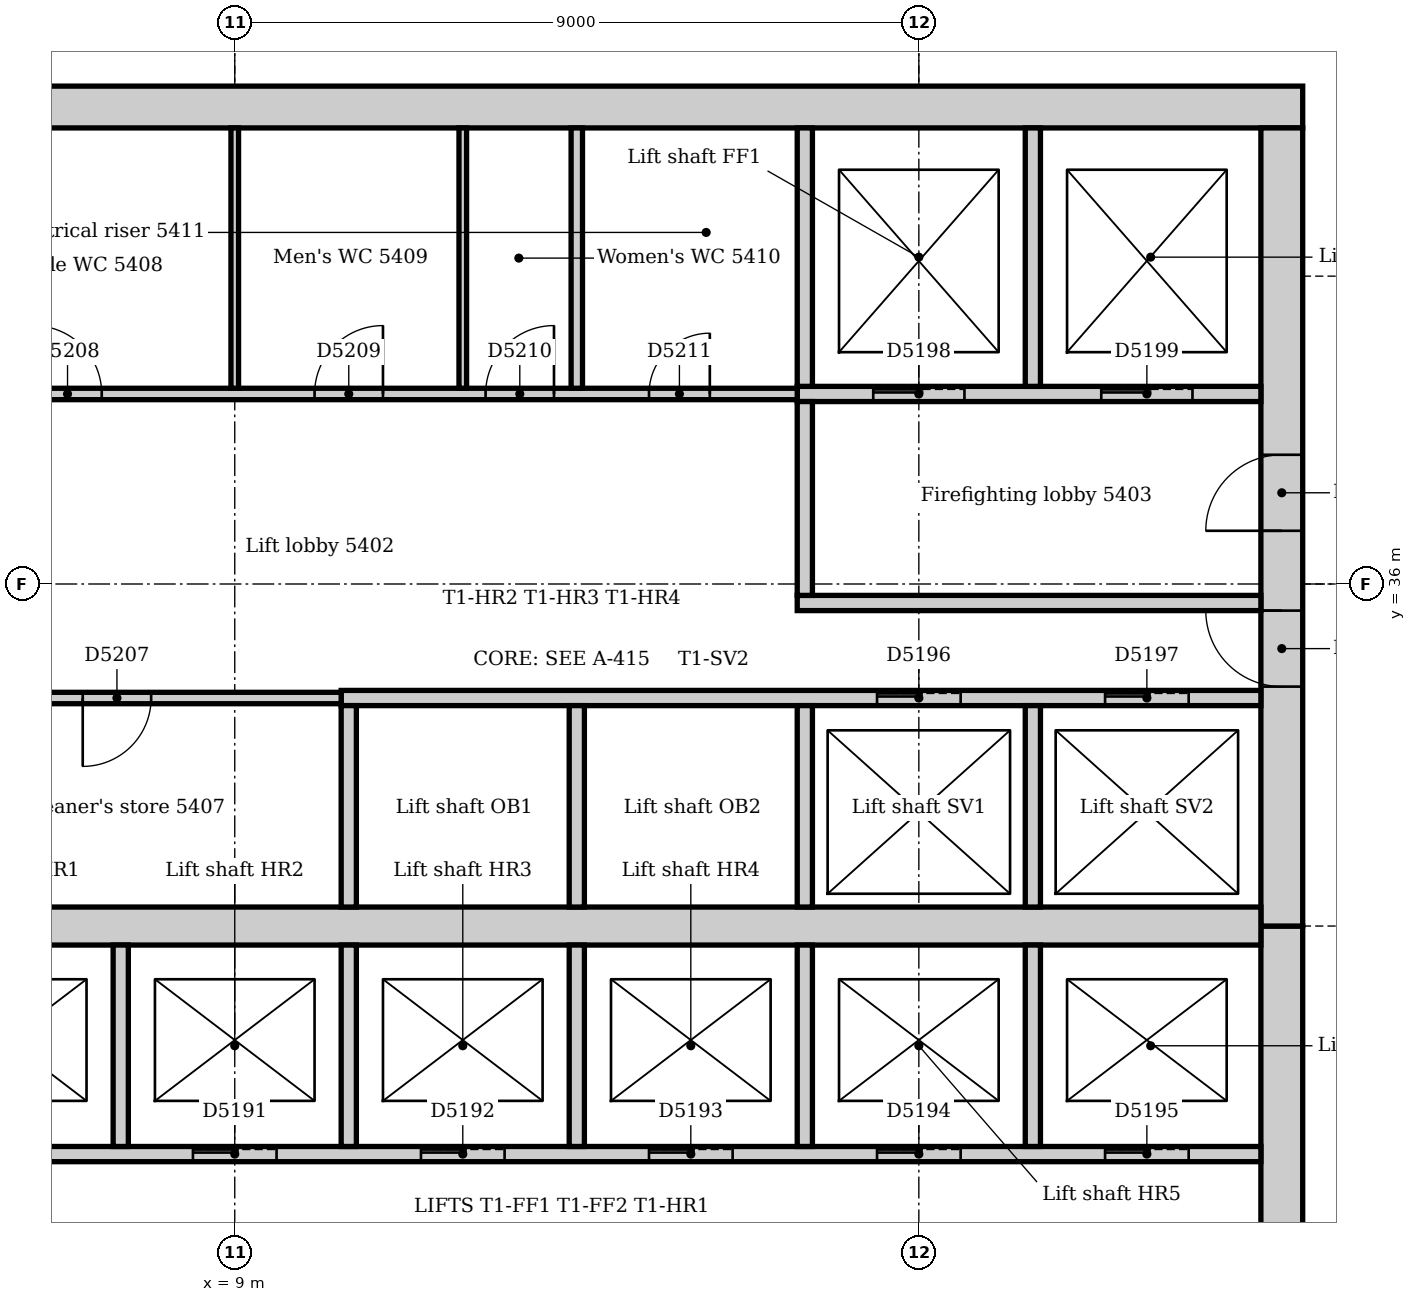
"""IFC4 building model, lengths in metres.
Left out: names, types, materials, properties, quantities, classifications, styles, units other than length and angle.
Written with IfcOpenShell. Run it as: python <this file> out.ifc"""

import sys

from ifc_helpers import new_model, si_unit, direction, frame, frame_2d, origin, place, context, subcontext, project, spatial, rectangle, extrude, element, fill, save


model = new_model("IFC4")
c1 = context("Model", 3, precision=1e-05, world=origin(), true_north=direction((0.0, 1.0)))
c2 = subcontext(c1, "Body", "Model", "MODEL_VIEW")
j1 = project(units=[si_unit("LENGTHUNIT", "METRE"), si_unit("PLANEANGLEUNIT", "RADIAN")], contexts=[c1])
p1 = place(None, origin())
s1 = spatial("IfcSite", under=j1, at=p1, CompositionType="ELEMENT")
p2 = place(p1, origin())
s2 = spatial("IfcBuilding", under=s1, at=p2, CompositionType="ELEMENT")
p3 = place(p2, frame((0.0, 0.0, 226.0)))
s3 = spatial("IfcBuildingStorey", under=s2, at=p3, CompositionType="ELEMENT", Elevation=226.0)
p4 = place(p3, frame((23.05, 42.275, 0.0), z_axis=(0.0, 0.0, 1.0), x_axis=(-1.0, 0.0, 0.0)))
e1 = element("IfcWall", 1, at=p4, inside=s3, PredefinedType="SOLIDWALL", context=c2, shape_type="SweptSolid", body=[
    extrude(rectangle(XDim=19.1, YDim=0.55, at=frame_2d((9.55, 0.0))), origin(), (0.0, 0.0, 1.0), 4.0),
])
p5 = place(p3, frame((22.775, 21.0, 0.0), z_axis=(0.0, 0.0, 1.0), x_axis=(0.0, 1.0, 0.0)))
e2 = element("IfcWall", 2, at=p5, inside=s3, PredefinedType="SOLIDWALL", context=c2, shape_type="SweptSolid", body=[
    extrude(rectangle(XDim=10.5, YDim=0.55, at=frame_2d((5.25, 0.0))), origin(), (0.0, 0.0, 1.0), 4.0),
])
p6 = place(p5, frame((4.35, 0.0, 0.0)))
e3 = element("IfcOpeningElement", 3, at=p6, cuts=e2, PredefinedType="OPENING", context=c2, shape_type="SweptSolid", body=[
    extrude(rectangle(XDim=1.8, YDim=2.1, at=frame_2d((0.9, 1.05))), frame((0.0, 0.285, 0.0), z_axis=(0.0, -1.0, 0.0), x_axis=(1.0, 0.0, 0.0)), (0.0, 0.0, 1.0), 0.57),
])
p7 = place(p3, frame((22.775, 31.5, 0.0), z_axis=(0.0, 0.0, 1.0), x_axis=(0.0, 1.0, 0.0)))
e4 = element("IfcWall", 4, at=p7, inside=s3, PredefinedType="SOLIDWALL", context=c2, shape_type="SweptSolid", body=[
    extrude(rectangle(XDim=10.5, YDim=0.55, at=frame_2d((5.25, 0.0))), origin(), (0.0, 0.0, 1.0), 4.0),
])
p8 = place(p7, frame((3.15, 0.0, 0.0)))
e5 = element("IfcOpeningElement", 5, at=p8, cuts=e4, PredefinedType="OPENING", context=c2, shape_type="SweptSolid", body=[
    extrude(rectangle(XDim=1.0, YDim=2.1, at=frame_2d((0.5, 1.05))), frame((0.0, 0.285, 0.0), z_axis=(0.0, -1.0, 0.0), x_axis=(1.0, 0.0, 0.0)), (0.0, 0.0, 1.0), 0.57),
])
p9 = place(p7, frame((5.2, 0.0, 0.0)))
e6 = element("IfcOpeningElement", 6, at=p9, cuts=e4, PredefinedType="OPENING", context=c2, shape_type="SweptSolid", body=[
    extrude(rectangle(XDim=1.0, YDim=2.1, at=frame_2d((0.5, 1.05))), frame((0.0, 0.285, 0.0), z_axis=(0.0, -1.0, 0.0), x_axis=(1.0, 0.0, 0.0)), (0.0, 0.0, 1.0), 0.57),
])
p10 = place(p3, frame((4.5, 31.5, 0.0), z_axis=(0.0, 0.0, 1.0), x_axis=(1.0, 0.0, 0.0)))
e7 = element("IfcWall", 7, at=p10, inside=s3, PredefinedType="SOLIDWALL", context=c2, shape_type="SweptSolid", body=[
    extrude(rectangle(XDim=18.0, YDim=0.5, at=frame_2d((9.0, 0.0))), origin(), (0.0, 0.0, 1.0), 4.0),
])
p11 = place(p3, frame((16.4, 35.75, 0.0), z_axis=(0.0, 0.0, 1.0), x_axis=(1.0, 0.0, 0.0)))
e8 = element("IfcWall", 8, at=p11, inside=s3, PredefinedType="PARTITIONING", context=c2, shape_type="SweptSolid", body=[
    extrude(rectangle(XDim=6.1, YDim=0.2, at=frame_2d((3.05, 0.0))), origin(), (0.0, 0.0, 1.0), 3.85),
])
p12 = place(p3, frame((16.4, 38.5, 0.0), z_axis=(0.0, 0.0, 1.0), x_axis=(1.0, 0.0, 0.0)))
e9 = element("IfcWall", 9, at=p12, inside=s3, PredefinedType="PARTITIONING", context=c2, shape_type="SweptSolid", body=[
    extrude(rectangle(XDim=6.1, YDim=0.2, at=frame_2d((3.05, 0.0))), origin(), (0.0, 0.0, 1.0), 3.85),
])
p13 = place(p12, frame((1.0, 0.0, 0.0)))
e10 = element("IfcOpeningElement", 10, at=p13, cuts=e9, PredefinedType="OPENING", context=c2, shape_type="SweptSolid", body=[
    extrude(rectangle(XDim=1.2, YDim=2.1, at=frame_2d((0.6, 1.05))), frame((0.0, 0.11, 0.0), z_axis=(0.0, -1.0, 0.0), x_axis=(1.0, 0.0, 0.0)), (0.0, 0.0, 1.0), 0.22),
])
p14 = place(p12, frame((4.0, 0.0, 0.0)))
e11 = element("IfcOpeningElement", 11, at=p14, cuts=e9, PredefinedType="OPENING", context=c2, shape_type="SweptSolid", body=[
    extrude(rectangle(XDim=1.2, YDim=2.1, at=frame_2d((0.6, 1.05))), frame((0.0, 0.11, 0.0), z_axis=(0.0, -1.0, 0.0), x_axis=(1.0, 0.0, 0.0)), (0.0, 0.0, 1.0), 0.22),
])
p15 = place(p3, frame((16.5, 35.85, 0.0), z_axis=(0.0, 0.0, 1.0), x_axis=(0.0, 1.0, 0.0)))
e12 = element("IfcWall", 12, at=p15, inside=s3, PredefinedType="PARTITIONING", context=c2, shape_type="SweptSolid", body=[
    extrude(rectangle(XDim=2.55, YDim=0.2, at=frame_2d((1.275, 0.0))), origin(), (0.0, 0.0, 1.0), 3.85),
])
p16 = place(p3, frame((4.5, 28.5, 0.0), z_axis=(0.0, 0.0, 1.0), x_axis=(1.0, 0.0, 0.0)))
e13 = element("IfcWall", 13, at=p16, inside=s3, PredefinedType="PARTITIONING", context=c2, shape_type="SweptSolid", body=[
    extrude(rectangle(XDim=18.0, YDim=0.2, at=frame_2d((9.0, 0.0))), origin(), (0.0, 0.0, 1.0), 3.85),
])
p17 = place(p16, frame((0.95, 0.0, 0.0)))
e14 = element("IfcOpeningElement", 14, at=p17, cuts=e13, PredefinedType="OPENING", context=c2, shape_type="SweptSolid", body=[
    extrude(rectangle(XDim=1.1, YDim=2.1, at=frame_2d((0.55, 1.05))), frame((0.0, 0.11, 0.0), z_axis=(0.0, -1.0, 0.0), x_axis=(1.0, 0.0, 0.0)), (0.0, 0.0, 1.0), 0.22),
])
p18 = place(p16, frame((3.95, 0.0, 0.0)))
e15 = element("IfcOpeningElement", 15, at=p18, cuts=e13, PredefinedType="OPENING", context=c2, shape_type="SweptSolid", body=[
    extrude(rectangle(XDim=1.1, YDim=2.1, at=frame_2d((0.55, 1.05))), frame((0.0, 0.11, 0.0), z_axis=(0.0, -1.0, 0.0), x_axis=(1.0, 0.0, 0.0)), (0.0, 0.0, 1.0), 0.22),
])
p19 = place(p16, frame((6.95, 0.0, 0.0)))
e16 = element("IfcOpeningElement", 16, at=p19, cuts=e13, PredefinedType="OPENING", context=c2, shape_type="SweptSolid", body=[
    extrude(rectangle(XDim=1.1, YDim=2.1, at=frame_2d((0.55, 1.05))), frame((0.0, 0.11, 0.0), z_axis=(0.0, -1.0, 0.0), x_axis=(1.0, 0.0, 0.0)), (0.0, 0.0, 1.0), 0.22),
])
p20 = place(p16, frame((9.95, 0.0, 0.0)))
e17 = element("IfcOpeningElement", 17, at=p20, cuts=e13, PredefinedType="OPENING", context=c2, shape_type="SweptSolid", body=[
    extrude(rectangle(XDim=1.1, YDim=2.1, at=frame_2d((0.55, 1.05))), frame((0.0, 0.11, 0.0), z_axis=(0.0, -1.0, 0.0), x_axis=(1.0, 0.0, 0.0)), (0.0, 0.0, 1.0), 0.22),
])
p21 = place(p16, frame((12.95, 0.0, 0.0)))
e18 = element("IfcOpeningElement", 18, at=p21, cuts=e13, PredefinedType="OPENING", context=c2, shape_type="SweptSolid", body=[
    extrude(rectangle(XDim=1.1, YDim=2.1, at=frame_2d((0.55, 1.05))), frame((0.0, 0.11, 0.0), z_axis=(0.0, -1.0, 0.0), x_axis=(1.0, 0.0, 0.0)), (0.0, 0.0, 1.0), 0.22),
])
p22 = place(p16, frame((15.95, 0.0, 0.0)))
e19 = element("IfcOpeningElement", 19, at=p22, cuts=e13, PredefinedType="OPENING", context=c2, shape_type="SweptSolid", body=[
    extrude(rectangle(XDim=1.1, YDim=2.1, at=frame_2d((0.55, 1.05))), frame((0.0, 0.11, 0.0), z_axis=(0.0, -1.0, 0.0), x_axis=(1.0, 0.0, 0.0)), (0.0, 0.0, 1.0), 0.22),
])
p23 = place(p3, frame((10.4, 34.5, 0.0), z_axis=(0.0, 0.0, 1.0), x_axis=(1.0, 0.0, 0.0)))
e20 = element("IfcWall", 20, at=p23, inside=s3, PredefinedType="PARTITIONING", context=c2, shape_type="SweptSolid", body=[
    extrude(rectangle(XDim=12.1, YDim=0.2, at=frame_2d((6.05, 0.0))), origin(), (0.0, 0.0, 1.0), 3.85),
])
p24 = place(p23, frame((7.05, 0.0, 0.0)))
e21 = element("IfcOpeningElement", 21, at=p24, cuts=e20, PredefinedType="OPENING", context=c2, shape_type="SweptSolid", body=[
    extrude(rectangle(XDim=1.1, YDim=2.1, at=frame_2d((0.55, 1.05))), frame((0.0, 0.11, 0.0), z_axis=(0.0, -1.0, 0.0), x_axis=(1.0, 0.0, 0.0)), (0.0, 0.0, 1.0), 0.22),
])
p25 = place(p23, frame((10.05, 0.0, 0.0)))
e22 = element("IfcOpeningElement", 22, at=p25, cuts=e20, PredefinedType="OPENING", context=c2, shape_type="SweptSolid", body=[
    extrude(rectangle(XDim=1.1, YDim=2.1, at=frame_2d((0.55, 1.05))), frame((0.0, 0.11, 0.0), z_axis=(0.0, -1.0, 0.0), x_axis=(1.0, 0.0, 0.0)), (0.0, 0.0, 1.0), 0.22),
])
for number, where, z_axis, x_axis in (
    (23, (10.5, 28.6, 0.0), (0.0, 0.0, 1.0), (0.0, 1.0, 0.0)),
    (24, (10.5, 31.75, 0.0), (0.0, 0.0, 1.0), (0.0, 1.0, 0.0)),
    (25, (13.5, 28.6, 0.0), (0.0, 0.0, 1.0), (0.0, 1.0, 0.0)),
    (26, (13.5, 31.75, 0.0), (0.0, 0.0, 1.0), (0.0, 1.0, 0.0)),
    (27, (16.5, 28.6, 0.0), (0.0, 0.0, 1.0), (0.0, 1.0, 0.0)),
    (28, (16.5, 31.75, 0.0), (0.0, 0.0, 1.0), (0.0, 1.0, 0.0)),
    (29, (19.5, 28.6, 0.0), (0.0, 0.0, 1.0), (0.0, 1.0, 0.0)),
    (30, (19.5, 31.75, 0.0), (0.0, 0.0, 1.0), (0.0, 1.0, 0.0)),
):
    element("IfcWall", number, at=place(p3, frame(where, z_axis=z_axis, x_axis=x_axis)), inside=s3, PredefinedType="PARTITIONING", context=c2, shape_type="SweptSolid", body=[
        extrude(rectangle(XDim=2.65, YDim=0.2, at=frame_2d((1.325, 0.0))), origin(), (0.0, 0.0, 1.0), 3.85),
    ])
for number, where, z_axis, x_axis in (
    (31, (16.5, 38.6, 0.0), (0.0, 0.0, 1.0), (0.0, 1.0, 0.0)),
    (32, (19.5, 38.6, 0.0), (0.0, 0.0, 1.0), (0.0, 1.0, 0.0)),
):
    element("IfcWall", number, at=place(p3, frame(where, z_axis=z_axis, x_axis=x_axis)), inside=s3, PredefinedType="PARTITIONING", context=c2, shape_type="SweptSolid", body=[
        extrude(rectangle(XDim=3.4, YDim=0.2, at=frame_2d((1.7, 0.0))), origin(), (0.0, 0.0, 1.0), 3.85),
    ])
p26 = place(p3, frame((7.5, 28.6, 0.0), z_axis=(0.0, 0.0, 1.0), x_axis=(0.0, 1.0, 0.0)))
e33 = element("IfcWall", 33, at=p26, inside=s3, PredefinedType="PARTITIONING", context=c2, shape_type="SweptSolid", body=[
    extrude(rectangle(XDim=2.65, YDim=0.2, at=frame_2d((1.325, 0.0))), origin(), (0.0, 0.0, 1.0), 3.85),
])
p27 = place(p3, frame((4.5, 38.5, 0.0), z_axis=(0.0, 0.0, 1.0), x_axis=(1.0, 0.0, 0.0)))
e34 = element("IfcWall", 34, at=p27, inside=s3, PredefinedType="PARTITIONING", context=c2, shape_type="SweptSolid", body=[
    extrude(rectangle(XDim=11.9, YDim=0.15, at=frame_2d((5.95, 0.0))), origin(), (0.0, 0.0, 1.0), 3.85),
])
p28 = place(p27, frame((1.85, 0.0, 0.0)))
e35 = element("IfcOpeningElement", 35, at=p28, cuts=e34, PredefinedType="OPENING", context=c2, shape_type="SweptSolid", body=[
    extrude(rectangle(XDim=0.9, YDim=2.1, at=frame_2d((0.45, 1.05))), frame((0.0, 0.085, 0.0), z_axis=(0.0, -1.0, 0.0), x_axis=(1.0, 0.0, 0.0)), (0.0, 0.0, 1.0), 0.17),
])
p29 = place(p27, frame((5.55, 0.0, 0.0)))
e36 = element("IfcOpeningElement", 36, at=p29, cuts=e34, PredefinedType="OPENING", context=c2, shape_type="SweptSolid", body=[
    extrude(rectangle(XDim=0.9, YDim=2.1, at=frame_2d((0.45, 1.05))), frame((0.0, 0.085, 0.0), z_axis=(0.0, -1.0, 0.0), x_axis=(1.0, 0.0, 0.0)), (0.0, 0.0, 1.0), 0.17),
])
p30 = place(p27, frame((7.8, 0.0, 0.0)))
e37 = element("IfcOpeningElement", 37, at=p30, cuts=e34, PredefinedType="OPENING", context=c2, shape_type="SweptSolid", body=[
    extrude(rectangle(XDim=0.9, YDim=2.1, at=frame_2d((0.45, 1.05))), frame((0.0, 0.085, 0.0), z_axis=(0.0, -1.0, 0.0), x_axis=(1.0, 0.0, 0.0)), (0.0, 0.0, 1.0), 0.17),
])
p31 = place(p27, frame((9.95, 0.0, 0.0)))
e38 = element("IfcOpeningElement", 38, at=p31, cuts=e34, PredefinedType="OPENING", context=c2, shape_type="SweptSolid", body=[
    extrude(rectangle(XDim=0.8, YDim=2.1, at=frame_2d((0.4, 1.05))), frame((0.0, 0.085, 0.0), z_axis=(0.0, -1.0, 0.0), x_axis=(1.0, 0.0, 0.0)), (0.0, 0.0, 1.0), 0.17),
])
p32 = place(p3, frame((4.5, 34.5, 0.0), z_axis=(0.0, 0.0, 1.0), x_axis=(1.0, 0.0, 0.0)))
e39 = element("IfcWall", 39, at=p32, inside=s3, PredefinedType="PARTITIONING", context=c2, shape_type="SweptSolid", body=[
    extrude(rectangle(XDim=5.9, YDim=0.15, at=frame_2d((2.95, 0.0))), origin(), (0.0, 0.0, 1.0), 3.85),
])
p33 = place(p32, frame((2.5, 0.0, 0.0)))
e40 = element("IfcOpeningElement", 40, at=p33, cuts=e39, PredefinedType="OPENING", context=c2, shape_type="SweptSolid", body=[
    extrude(rectangle(XDim=0.9, YDim=2.1, at=frame_2d((0.45, 1.05))), frame((0.0, 0.085, 0.0), z_axis=(0.0, -1.0, 0.0), x_axis=(1.0, 0.0, 0.0)), (0.0, 0.0, 1.0), 0.17),
])
p34 = place(p3, frame((13.5, 38.575, 0.0), z_axis=(0.0, 0.0, 1.0), x_axis=(0.0, 1.0, 0.0)))
e41 = element("IfcWall", 41, at=p34, inside=s3, PredefinedType="PARTITIONING", context=c2, shape_type="SweptSolid", body=[
    extrude(rectangle(XDim=3.425, YDim=0.15, at=frame_2d((1.712, 0.0))), origin(), (0.0, 0.0, 1.0), 3.85),
])
for number, where, z_axis, x_axis in (
    (42, (9.0, 38.575, 0.0), (0.0, 0.0, 1.0), (0.0, 1.0, 0.0)),
    (43, (12.0, 38.575, 0.0), (0.0, 0.0, 1.0), (0.0, 1.0, 0.0)),
):
    element("IfcWall", number, at=place(p3, frame(where, z_axis=z_axis, x_axis=x_axis)), inside=s3, PredefinedType="PARTITIONING", context=c2, shape_type="SweptSolid", body=[
        extrude(rectangle(XDim=3.425, YDim=0.1, at=frame_2d((1.712, 0.0))), origin(), (0.0, 0.0, 1.0), 3.85),
    ])
p35 = place(p18, origin())
e44 = element("IfcDoor", 44, at=p35, inside=s3, OperationType="SLIDING_TO_LEFT", PredefinedType="DOOR", context=c2, shape_type="SweptSolid", body=[
    extrude(rectangle(XDim=1.1, YDim=2.1, at=frame_2d((0.55, 1.05))), frame((0.0, 0.025, 0.0), z_axis=(0.0, -1.0, 0.0), x_axis=(1.0, 0.0, 0.0)), (0.0, 0.0, 1.0), 0.05),
])
fill(e15, e44)
p36 = place(p19, origin())
e45 = element("IfcDoor", 45, at=p36, inside=s3, OperationType="SLIDING_TO_LEFT", PredefinedType="DOOR", context=c2, shape_type="SweptSolid", body=[
    extrude(rectangle(XDim=1.1, YDim=2.1, at=frame_2d((0.55, 1.05))), frame((0.0, 0.025, 0.0), z_axis=(0.0, -1.0, 0.0), x_axis=(1.0, 0.0, 0.0)), (0.0, 0.0, 1.0), 0.05),
])
fill(e16, e45)
p37 = place(p20, origin())
e46 = element("IfcDoor", 46, at=p37, inside=s3, OperationType="SLIDING_TO_LEFT", PredefinedType="DOOR", context=c2, shape_type="SweptSolid", body=[
    extrude(rectangle(XDim=1.1, YDim=2.1, at=frame_2d((0.55, 1.05))), frame((0.0, 0.025, 0.0), z_axis=(0.0, -1.0, 0.0), x_axis=(1.0, 0.0, 0.0)), (0.0, 0.0, 1.0), 0.05),
])
fill(e17, e46)
p38 = place(p21, origin())
e47 = element("IfcDoor", 47, at=p38, inside=s3, OperationType="SLIDING_TO_LEFT", PredefinedType="DOOR", context=c2, shape_type="SweptSolid", body=[
    extrude(rectangle(XDim=1.1, YDim=2.1, at=frame_2d((0.55, 1.05))), frame((0.0, 0.025, 0.0), z_axis=(0.0, -1.0, 0.0), x_axis=(1.0, 0.0, 0.0)), (0.0, 0.0, 1.0), 0.05),
])
fill(e18, e47)
p39 = place(p22, origin())
e48 = element("IfcDoor", 48, at=p39, inside=s3, OperationType="SLIDING_TO_LEFT", PredefinedType="DOOR", context=c2, shape_type="SweptSolid", body=[
    extrude(rectangle(XDim=1.1, YDim=2.1, at=frame_2d((0.55, 1.05))), frame((0.0, 0.025, 0.0), z_axis=(0.0, -1.0, 0.0), x_axis=(1.0, 0.0, 0.0)), (0.0, 0.0, 1.0), 0.05),
])
fill(e19, e48)
p40 = place(p24, origin())
e49 = element("IfcDoor", 49, at=p40, inside=s3, OperationType="SLIDING_TO_LEFT", PredefinedType="DOOR", context=c2, shape_type="SweptSolid", body=[
    extrude(rectangle(XDim=1.1, YDim=2.1, at=frame_2d((0.55, 1.05))), frame((0.0, 0.025, 0.0), z_axis=(0.0, -1.0, 0.0), x_axis=(1.0, 0.0, 0.0)), (0.0, 0.0, 1.0), 0.05),
])
fill(e21, e49)
p41 = place(p25, origin())
e50 = element("IfcDoor", 50, at=p41, inside=s3, OperationType="SLIDING_TO_LEFT", PredefinedType="DOOR", context=c2, shape_type="SweptSolid", body=[
    extrude(rectangle(XDim=1.1, YDim=2.1, at=frame_2d((0.55, 1.05))), frame((0.0, 0.025, 0.0), z_axis=(0.0, -1.0, 0.0), x_axis=(1.0, 0.0, 0.0)), (0.0, 0.0, 1.0), 0.05),
])
fill(e22, e50)
p42 = place(p13, origin())
e51 = element("IfcDoor", 51, at=p42, inside=s3, OperationType="SLIDING_TO_LEFT", PredefinedType="DOOR", context=c2, shape_type="SweptSolid", body=[
    extrude(rectangle(XDim=1.2, YDim=2.1, at=frame_2d((0.6, 1.05))), frame((0.0, 0.025, 0.0), z_axis=(0.0, -1.0, 0.0), x_axis=(1.0, 0.0, 0.0)), (0.0, 0.0, 1.0), 0.05),
])
fill(e10, e51)
p43 = place(p14, origin())
e52 = element("IfcDoor", 52, at=p43, inside=s3, OperationType="SLIDING_TO_LEFT", PredefinedType="DOOR", context=c2, shape_type="SweptSolid", body=[
    extrude(rectangle(XDim=1.2, YDim=2.1, at=frame_2d((0.6, 1.05))), frame((0.0, 0.025, 0.0), z_axis=(0.0, -1.0, 0.0), x_axis=(1.0, 0.0, 0.0)), (0.0, 0.0, 1.0), 0.05),
])
fill(e11, e52)
p44 = place(p8, origin())
e53 = element("IfcDoor", 53, at=p44, inside=s3, OperationType="SINGLE_SWING_RIGHT", PredefinedType="DOOR", context=c2, shape_type="SweptSolid", body=[
    extrude(rectangle(XDim=1.0, YDim=2.1, at=frame_2d((0.5, 1.05))), frame((0.0, 0.025, 0.0), z_axis=(0.0, -1.0, 0.0), x_axis=(1.0, 0.0, 0.0)), (0.0, 0.0, 1.0), 0.05),
])
fill(e5, e53)
p45 = place(p9, origin())
e54 = element("IfcDoor", 54, at=p45, inside=s3, OperationType="SINGLE_SWING_LEFT", PredefinedType="DOOR", context=c2, shape_type="SweptSolid", body=[
    extrude(rectangle(XDim=1.0, YDim=2.1, at=frame_2d((0.5, 1.05))), frame((0.0, 0.025, 0.0), z_axis=(0.0, -1.0, 0.0), x_axis=(1.0, 0.0, 0.0)), (0.0, 0.0, 1.0), 0.05),
])
fill(e6, e54)
p46 = place(p33, frame((0.9, 0.0, 0.0), z_axis=(0.0, 0.0, 1.0), x_axis=(-1.0, 0.0, 0.0)))
e55 = element("IfcDoor", 55, at=p46, inside=s3, OperationType="SINGLE_SWING_RIGHT", PredefinedType="DOOR", context=c2, shape_type="SweptSolid", body=[
    extrude(rectangle(XDim=0.9, YDim=2.1, at=frame_2d((0.45, 1.05))), frame((0.0, 0.025, 0.0), z_axis=(0.0, -1.0, 0.0), x_axis=(1.0, 0.0, 0.0)), (0.0, 0.0, 1.0), 0.05),
])
fill(e40, e55)
p47 = place(p28, origin())
e56 = element("IfcDoor", 56, at=p47, inside=s3, OperationType="SINGLE_SWING_LEFT", PredefinedType="DOOR", context=c2, shape_type="SweptSolid", body=[
    extrude(rectangle(XDim=0.9, YDim=2.1, at=frame_2d((0.45, 1.05))), frame((0.0, 0.025, 0.0), z_axis=(0.0, -1.0, 0.0), x_axis=(1.0, 0.0, 0.0)), (0.0, 0.0, 1.0), 0.05),
])
fill(e35, e56)
p48 = place(p29, origin())
e57 = element("IfcDoor", 57, at=p48, inside=s3, OperationType="SINGLE_SWING_RIGHT", PredefinedType="DOOR", context=c2, shape_type="SweptSolid", body=[
    extrude(rectangle(XDim=0.9, YDim=2.1, at=frame_2d((0.45, 1.05))), frame((0.0, 0.025, 0.0), z_axis=(0.0, -1.0, 0.0), x_axis=(1.0, 0.0, 0.0)), (0.0, 0.0, 1.0), 0.05),
])
fill(e36, e57)
p49 = place(p30, origin())
e58 = element("IfcDoor", 58, at=p49, inside=s3, OperationType="SINGLE_SWING_RIGHT", PredefinedType="DOOR", context=c2, shape_type="SweptSolid", body=[
    extrude(rectangle(XDim=0.9, YDim=2.1, at=frame_2d((0.45, 1.05))), frame((0.0, 0.025, 0.0), z_axis=(0.0, -1.0, 0.0), x_axis=(1.0, 0.0, 0.0)), (0.0, 0.0, 1.0), 0.05),
])
fill(e37, e58)
p50 = place(p31, origin())
e59 = element("IfcDoor", 59, at=p50, inside=s3, OperationType="SINGLE_SWING_RIGHT", PredefinedType="DOOR", context=c2, shape_type="SweptSolid", body=[
    extrude(rectangle(XDim=0.8, YDim=2.1, at=frame_2d((0.4, 1.05))), frame((0.0, 0.025, 0.0), z_axis=(0.0, -1.0, 0.0), x_axis=(1.0, 0.0, 0.0)), (0.0, 0.0, 1.0), 0.05),
])
fill(e38, e59)
save(model, sys.argv[1])
